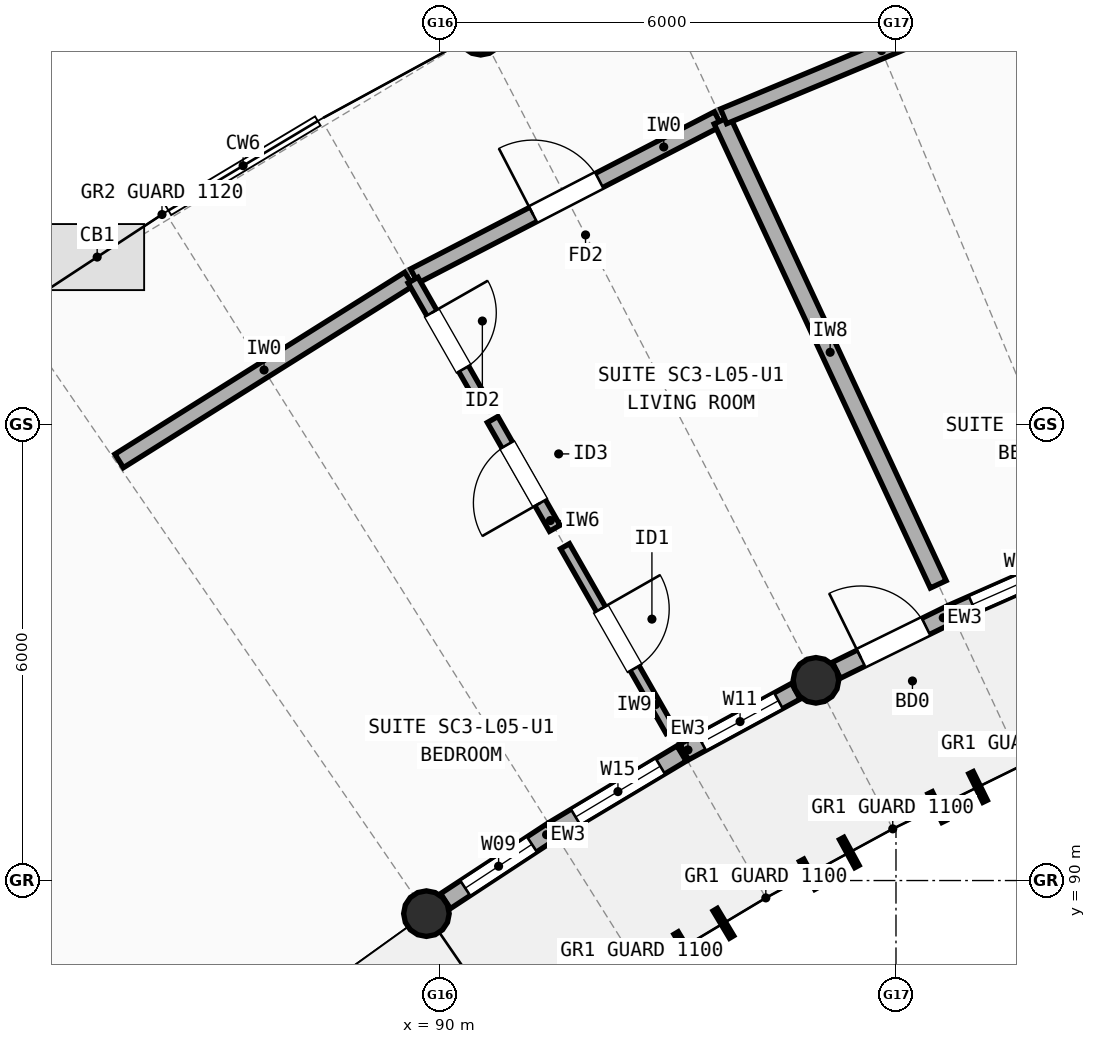
"""IFC4 building model, lengths in metres.
Left out: names, types, materials, properties, quantities, classifications, styles, units other than length and angle.
Written with IfcOpenShell. Run it as: python <this file> out.ifc"""

import sys

from ifc_helpers import new_model, si_unit, direction, frame, frame_2d, origin, origin_2d, place, context, subcontext, project, spatial, rectangle, circle, extrude, element, fill, save


model = new_model("IFC4")
c1 = context("Model", 3, precision=1e-05, world=origin(), true_north=direction((0.0, 1.0)))
c2 = subcontext(c1, "Body", "Model", "MODEL_VIEW")
j1 = project(units=[si_unit("LENGTHUNIT", "METRE"), si_unit("PLANEANGLEUNIT", "RADIAN")], contexts=[c1])
p1 = place(None, origin())
s1 = spatial("IfcSite", under=j1, at=p1, CompositionType="ELEMENT")
p2 = place(p1, origin())
s2 = spatial("IfcBuilding", under=s1, at=p2, CompositionType="ELEMENT")
p3 = place(p2, frame((0.0, 0.0, 17.3)))
s3 = spatial("IfcBuildingStorey", under=s2, at=p3, CompositionType="ELEMENT", Elevation=17.3)
for number, where, z_axis, x_axis in (
    (1, (89.822, 89.564, 0.0), (0.0, 0.0, 1.0), (1.0, 0.0, 0.0)),
    (2, (94.947, 92.634, 0.0), (0.0, 0.0, 1.0), (1.0, 0.0, 0.0)),
    (3, (90.536, 101.161, 0.0), (0.0, 0.0, 1.0), (1.0, 0.0, 0.0)),
):
    element("IfcColumn", number, at=place(p3, frame(where, z_axis=z_axis, x_axis=x_axis)), inside=s3, PredefinedType="COLUMN", context=c2, shape_type="SweptSolid", body=[
        extrude(circle(Radius=0.3, at=origin_2d()), origin(), (0.0, 0.0, 1.0), 2.94),
    ])
p4 = place(p3, frame((90.073, 89.729, 0.0), z_axis=(0.0, 0.0, 1.0), x_axis=(0.83589302699, 0.548892382375, 0.0)))
e4 = element("IfcWall", 4, at=p4, inside=s3, PredefinedType="STANDARD", context=c2, shape_type="SweptSolid", body=[
    extrude(rectangle(XDim=1.672, YDim=0.235, at=frame_2d((0.836, 0.0))), origin(), (0.0, 0.0, 1.0), 2.676),
])
p5 = place(p4, frame((0.311, 0.0, 0.85)))
e5 = element("IfcOpeningElement", 5, at=p5, cuts=e4, PredefinedType="OPENING", context=c2, shape_type="SweptSolid", body=[
    extrude(rectangle(XDim=1.05, YDim=1.35, at=frame_2d((0.525, 0.675))), frame((0.0, 0.127, 0.0), z_axis=(0.0, -1.0, 0.0), x_axis=(1.0, 0.0, 0.0)), (0.0, 0.0, 1.0), 0.255),
])
p6 = place(p3, frame((91.504, 90.668, 0.0), z_axis=(0.0, 0.0, 1.0), x_axis=(0.85787888411, 0.51385194385, 0.0)))
e6 = element("IfcWall", 6, at=p6, inside=s3, PredefinedType="STANDARD", context=c2, shape_type="SweptSolid", body=[
    extrude(rectangle(XDim=1.952, YDim=0.235, at=frame_2d((0.976, 0.0))), origin(), (0.0, 0.0, 1.0), 2.676),
])
p7 = place(p6, frame((0.326, 0.0, 0.85)))
e7 = element("IfcOpeningElement", 7, at=p7, cuts=e6, PredefinedType="OPENING", context=c2, shape_type="SweptSolid", body=[
    extrude(rectangle(XDim=1.3, YDim=1.45, at=frame_2d((0.65, 0.725))), frame((0.0, 0.127, 0.0), z_axis=(0.0, -1.0, 0.0), x_axis=(1.0, 0.0, 0.0)), (0.0, 0.0, 1.0), 0.255),
])
p8 = place(p3, frame((93.214, 91.692, 0.0), z_axis=(0.0, 0.0, 1.0), x_axis=(0.878508628322, 0.477726480284, 0.0)))
e8 = element("IfcWall", 8, at=p8, inside=s3, PredefinedType="STANDARD", context=c2, shape_type="SweptSolid", body=[
    extrude(rectangle(XDim=1.672, YDim=0.235, at=frame_2d((0.836, 0.0))), origin(), (0.0, 0.0, 1.0), 2.676),
])
p9 = place(p8, frame((0.261, 0.0, 0.85)))
e9 = element("IfcOpeningElement", 9, at=p9, cuts=e8, PredefinedType="OPENING", context=c2, shape_type="SweptSolid", body=[
    extrude(rectangle(XDim=1.15, YDim=1.45, at=frame_2d((0.575, 0.725))), frame((0.0, 0.127, 0.0), z_axis=(0.0, -1.0, 0.0), x_axis=(1.0, 0.0, 0.0)), (0.0, 0.0, 1.0), 0.255),
])
p10 = place(p3, frame((95.216, 92.766, 0.0), z_axis=(0.0, 0.0, 1.0), x_axis=(0.897558380725, 0.440895626186, 0.0)))
e10 = element("IfcWall", 10, at=p10, inside=s3, PredefinedType="STANDARD", context=c2, shape_type="SweptSolid", body=[
    extrude(rectangle(XDim=1.672, YDim=0.235, at=frame_2d((0.836, 0.0))), origin(), (0.0, 0.0, 1.0), 2.676),
])
p11 = place(p10, frame((0.361, 0.0, 0.0)))
e11 = element("IfcOpeningElement", 11, at=p11, cuts=e10, PredefinedType="OPENING", context=c2, shape_type="SweptSolid", body=[
    extrude(rectangle(XDim=0.95, YDim=2.12, at=frame_2d((0.475, 1.06))), frame((0.0, 0.127, 0.0), z_axis=(0.0, -1.0, 0.0), x_axis=(1.0, 0.0, 0.0)), (0.0, 0.0, 1.0), 0.255),
])
p12 = place(p3, frame((96.753, 93.521, 0.0), z_axis=(0.0, 0.0, 1.0), x_axis=(0.915126852478, 0.403166025197, 0.0)))
e12 = element("IfcWall", 12, at=p12, inside=s3, PredefinedType="STANDARD", context=c2, shape_type="SweptSolid", body=[
    extrude(rectangle(XDim=1.952, YDim=0.235, at=frame_2d((0.976, 0.0))), origin(), (0.0, 0.0, 1.0), 2.676),
])
p13 = place(p12, frame((0.276, 0.0, 0.85)))
e13 = element("IfcOpeningElement", 13, at=p13, cuts=e12, PredefinedType="OPENING", context=c2, shape_type="SweptSolid", body=[
    extrude(rectangle(XDim=1.4, YDim=1.5, at=frame_2d((0.7, 0.75))), frame((0.0, 0.127, 0.0), z_axis=(0.0, -1.0, 0.0), x_axis=(1.0, 0.0, 0.0)), (0.0, 0.0, 1.0), 0.255),
])
p14 = place(p3, frame((85.779, 95.521, 0.0), z_axis=(0.0, 0.0, 1.0), x_axis=(0.847037081085, 0.531533802563, 0.0)))
e14 = element("IfcWall", 14, at=p14, inside=s3, PredefinedType="SOLIDWALL", context=c2, shape_type="SweptSolid", body=[
    extrude(rectangle(XDim=4.501, YDim=0.21, at=frame_2d((2.25, 0.0))), origin(), (0.0, 0.0, 1.0), 2.754),
])
p15 = place(p3, frame((89.661, 97.953, 0.0), z_axis=(0.0, 0.0, 1.0), x_axis=(0.888203141908, 0.459450953536, 0.0)))
e15 = element("IfcWall", 15, at=p15, inside=s3, PredefinedType="SOLIDWALL", context=c2, shape_type="SweptSolid", body=[
    extrude(rectangle(XDim=4.501, YDim=0.21, at=frame_2d((2.25, 0.0))), origin(), (0.0, 0.0, 1.0), 2.734),
])
p16 = place(p15, frame((1.761, 0.0, 0.0)))
e16 = element("IfcOpeningElement", 16, at=p16, cuts=e15, PredefinedType="OPENING", context=c2, shape_type="SweptSolid", body=[
    extrude(rectangle(XDim=0.98, YDim=2.15, at=frame_2d((0.49, 1.075))), frame((0.0, 0.115, 0.0), z_axis=(0.0, -1.0, 0.0), x_axis=(1.0, 0.0, 0.0)), (0.0, 0.0, 1.0), 0.23),
])
p17 = place(p3, frame((93.034, 91.967, 0.0), z_axis=(0.0, 0.0, 1.0), x_axis=(-0.495951127449, 0.868350435701, 0.0)))
e17 = element("IfcWall", 17, at=p17, inside=s3, PredefinedType="PARTITIONING", context=c2, shape_type="SweptSolid", body=[
    extrude(rectangle(XDim=2.8, YDim=0.135, at=frame_2d((1.4, 0.0))), origin(), (0.0, 0.0, 1.0), 2.714),
])
p18 = place(p17, frame((0.95, 0.0, 0.0)))
e18 = element("IfcOpeningElement", 18, at=p18, cuts=e17, PredefinedType="OPENING", context=c2, shape_type="SweptSolid", body=[
    extrude(rectangle(XDim=0.9, YDim=2.1, at=frame_2d((0.45, 1.05))), frame((0.0, 0.077, 0.0), z_axis=(0.0, -1.0, 0.0), x_axis=(1.0, 0.0, 0.0)), (0.0, 0.0, 1.0), 0.155),
])
p19 = place(p3, frame((91.51, 94.635, 0.0), z_axis=(0.0, 0.0, 1.0), x_axis=(-0.49583578404, 0.868416302971, 0.0)))
e19 = element("IfcWall", 19, at=p19, inside=s3, PredefinedType="PLUMBINGWALL", context=c2, shape_type="SweptSolid", body=[
    extrude(rectangle(XDim=1.648, YDim=0.16, at=frame_2d((0.824, 0.0))), origin(), (0.0, 0.0, 1.0), 2.714),
])
p20 = place(p19, frame((0.384, 0.0, 0.0)))
e20 = element("IfcOpeningElement", 20, at=p20, cuts=e19, PredefinedType="OPENING", context=c2, shape_type="SweptSolid", body=[
    extrude(rectangle(XDim=0.88, YDim=2.1, at=frame_2d((0.44, 1.05))), frame((0.0, 0.09, 0.0), z_axis=(0.0, -1.0, 0.0), x_axis=(1.0, 0.0, 0.0)), (0.0, 0.0, 1.0), 0.18),
])
p21 = place(p3, frame((90.558, 96.302, 0.0), z_axis=(0.0, 0.0, 1.0), x_axis=(-0.495938892217, 0.868357423638, 0.0)))
e21 = element("IfcWall", 21, at=p21, inside=s3, PredefinedType="PARTITIONING", context=c2, shape_type="SweptSolid", body=[
    extrude(rectangle(XDim=1.84, YDim=0.15, at=frame_2d((0.92, 0.0))), origin(), (0.0, 0.0, 1.0), 2.714),
])
p22 = place(p21, frame((0.495, 0.0, 0.0)))
e22 = element("IfcOpeningElement", 22, at=p22, cuts=e21, PredefinedType="OPENING", context=c2, shape_type="SweptSolid", body=[
    extrude(rectangle(XDim=0.85, YDim=2.1, at=frame_2d((0.425, 1.05))), frame((0.0, 0.085, 0.0), z_axis=(0.0, -1.0, 0.0), x_axis=(1.0, 0.0, 0.0)), (0.0, 0.0, 1.0), 0.17),
])
p23 = place(p3, frame((96.556, 93.897, 0.0), z_axis=(0.0, 0.0, 1.0), x_axis=(-0.422206763189, 0.906499558256, 0.0)))
e23 = element("IfcWall", 23, at=p23, inside=s3, PredefinedType="SOLIDWALL", context=c2, shape_type="SweptSolid", body=[
    extrude(rectangle(XDim=6.736, YDim=0.23, at=frame_2d((3.368, 0.0))), origin(), (0.0, 0.0, 1.0), 2.754),
])
p24 = place(p3, frame((93.732, 100.055, 0.0), z_axis=(0.0, 0.0, 1.0), x_axis=(0.923267760269, 0.384157054925, 0.0)))
e24 = element("IfcWall", 24, at=p24, inside=s3, PredefinedType="SOLIDWALL", context=c2, shape_type="SweptSolid", body=[
    extrude(rectangle(XDim=4.501, YDim=0.21, at=frame_2d((2.251, 0.0))), origin(), (0.0, 0.0, 1.0), 2.714),
])
p25 = place(p5, origin())
e25 = element("IfcWindow", 25, at=p25, inside=s3, PartitioningType="SINGLE_PANEL", PredefinedType="WINDOW", context=c2, shape_type="SweptSolid", body=[
    extrude(rectangle(XDim=1.05, YDim=1.35, at=frame_2d((0.525, 0.675))), frame((0.0, 0.03, 0.0), z_axis=(0.0, -1.0, 0.0), x_axis=(1.0, 0.0, 0.0)), (0.0, 0.0, 1.0), 0.06),
])
fill(e5, e25)
p26 = place(p7, origin())
e26 = element("IfcWindow", 26, at=p26, inside=s3, PartitioningType="SINGLE_PANEL", PredefinedType="WINDOW", context=c2, shape_type="SweptSolid", body=[
    extrude(rectangle(XDim=1.3, YDim=1.45, at=frame_2d((0.65, 0.725))), frame((0.0, 0.03, 0.0), z_axis=(0.0, -1.0, 0.0), x_axis=(1.0, 0.0, 0.0)), (0.0, 0.0, 1.0), 0.06),
])
fill(e7, e26)
p27 = place(p9, origin())
e27 = element("IfcWindow", 27, at=p27, inside=s3, PartitioningType="SINGLE_PANEL", PredefinedType="WINDOW", context=c2, shape_type="SweptSolid", body=[
    extrude(rectangle(XDim=1.15, YDim=1.45, at=frame_2d((0.575, 0.725))), frame((0.0, 0.03, 0.0), z_axis=(0.0, -1.0, 0.0), x_axis=(1.0, 0.0, 0.0)), (0.0, 0.0, 1.0), 0.06),
])
fill(e9, e27)
p28 = place(p11, frame((0.95, 0.0, 0.0), z_axis=(0.0, 0.0, 1.0), x_axis=(-1.0, 0.0, 0.0)))
e28 = element("IfcDoor", 28, at=p28, inside=s3, OperationType="SINGLE_SWING_LEFT", PredefinedType="DOOR", context=c2, shape_type="SweptSolid", body=[
    extrude(rectangle(XDim=0.95, YDim=2.12, at=frame_2d((0.475, 1.06))), frame((0.0, 0.025, 0.0), z_axis=(0.0, -1.0, 0.0), x_axis=(1.0, 0.0, 0.0)), (0.0, 0.0, 1.0), 0.05),
])
fill(e11, e28)
p29 = place(p13, origin())
e29 = element("IfcWindow", 29, at=p29, inside=s3, PartitioningType="SINGLE_PANEL", PredefinedType="WINDOW", context=c2, shape_type="SweptSolid", body=[
    extrude(rectangle(XDim=1.4, YDim=1.5, at=frame_2d((0.7, 0.75))), frame((0.0, 0.03, 0.0), z_axis=(0.0, -1.0, 0.0), x_axis=(1.0, 0.0, 0.0)), (0.0, 0.0, 1.0), 0.06),
])
fill(e13, e29)
p30 = place(p16, origin())
e30 = element("IfcDoor", 30, at=p30, inside=s3, OperationType="SINGLE_SWING_LEFT", PredefinedType="DOOR", context=c2, shape_type="SweptSolid", body=[
    extrude(rectangle(XDim=0.98, YDim=2.15, at=frame_2d((0.49, 1.075))), frame((0.0, 0.025, 0.0), z_axis=(0.0, -1.0, 0.0), x_axis=(1.0, 0.0, 0.0)), (0.0, 0.0, 1.0), 0.05),
])
fill(e16, e30)
p31 = place(p18, origin())
e31 = element("IfcDoor", 31, at=p31, inside=s3, OperationType="SINGLE_SWING_RIGHT", PredefinedType="DOOR", context=c2, shape_type="SweptSolid", body=[
    extrude(rectangle(XDim=0.9, YDim=2.1, at=frame_2d((0.45, 1.05))), frame((0.0, 0.025, 0.0), z_axis=(0.0, -1.0, 0.0), x_axis=(1.0, 0.0, 0.0)), (0.0, 0.0, 1.0), 0.05),
])
fill(e18, e31)
p32 = place(p20, origin())
e32 = element("IfcDoor", 32, at=p32, inside=s3, OperationType="SINGLE_SWING_LEFT", PredefinedType="DOOR", context=c2, shape_type="SweptSolid", body=[
    extrude(rectangle(XDim=0.88, YDim=2.1, at=frame_2d((0.44, 1.05))), frame((0.0, 0.025, 0.0), z_axis=(0.0, -1.0, 0.0), x_axis=(1.0, 0.0, 0.0)), (0.0, 0.0, 1.0), 0.05),
])
fill(e20, e32)
p33 = place(p22, origin())
e33 = element("IfcDoor", 33, at=p33, inside=s3, OperationType="SINGLE_SWING_RIGHT", PredefinedType="DOOR", context=c2, shape_type="SweptSolid", body=[
    extrude(rectangle(XDim=0.85, YDim=2.1, at=frame_2d((0.425, 1.05))), frame((0.0, 0.025, 0.0), z_axis=(0.0, -1.0, 0.0), x_axis=(1.0, 0.0, 0.0)), (0.0, 0.0, 1.0), 0.05),
])
fill(e22, e33)
save(model, sys.argv[1])
